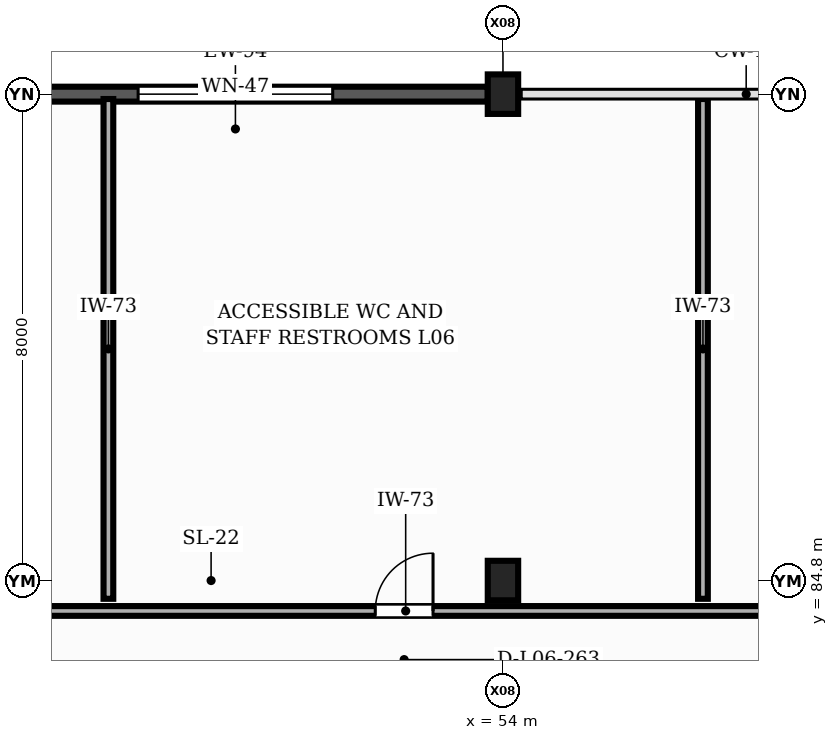
"""IFC4 building model, lengths in metres.
Left out: names, types, materials, properties, quantities, classifications, styles, units other than length and angle.
Written with IfcOpenShell. Run it as: python <this file> out.ifc"""

import sys

from ifc_helpers import new_model, si_unit, direction, frame, frame_2d, origin, origin_2d, place, context, subcontext, project, spatial, rectangle, extrude, element, fill, save


model = new_model("IFC4")
c1 = context("Model", 3, precision=1e-05, world=origin(), true_north=direction((0.0, 1.0)))
c2 = subcontext(c1, "Body", "Model", "MODEL_VIEW")
j1 = project(units=[si_unit("LENGTHUNIT", "METRE"), si_unit("PLANEANGLEUNIT", "RADIAN")], contexts=[c1])
p1 = place(None, origin())
s1 = spatial("IfcSite", under=j1, at=p1, CompositionType="ELEMENT")
p2 = place(p1, origin())
s2 = spatial("IfcBuilding", under=s1, at=p2, CompositionType="ELEMENT")
p3 = place(p2, frame((0.0, 0.0, 25.8)))
s3 = spatial("IfcBuildingStorey", under=s2, at=p3, CompositionType="ELEMENT", Elevation=25.8)
for number, where, z_axis, x_axis in (
    (1, (54.0, 84.8, 0.0), (0.0, 0.0, 1.0), (1.0, 0.0, 0.0)),
    (2, (54.0, 92.8, 0.0), (0.0, 0.0, 1.0), (1.0, 0.0, 0.0)),
):
    element("IfcColumn", number, at=place(p3, frame(where, z_axis=z_axis, x_axis=x_axis)), inside=s3, PredefinedType="COLUMN", context=c2, shape_type="SweptSolid", body=[
        extrude(rectangle(XDim=0.5, YDim=0.65, at=origin_2d()), origin(), (0.0, 0.0, 1.0), 3.9),
    ])
p4 = place(p3, frame((53.75, 92.8, 0.0), z_axis=(0.0, 0.0, 1.0), x_axis=(-1.0, 0.0, 0.0)))
e3 = element("IfcWall", 3, at=p4, inside=s3, PredefinedType="SOLIDWALL", context=c2, shape_type="SweptSolid", body=[
    extrude(rectangle(XDim=8.3, YDim=0.245, at=frame_2d((4.15, 0.0))), origin(), (0.0, 0.0, 1.0), 3.01),
])
p5 = place(p4, frame((2.55, 0.0, 0.9)))
e4 = element("IfcOpeningElement", 4, at=p5, cuts=e3, PredefinedType="OPENING", context=c2, shape_type="SweptSolid", body=[
    extrude(rectangle(XDim=3.2, YDim=1.6, at=frame_2d((1.6, 0.8))), frame((0.0, 0.133, 0.0), z_axis=(0.0, -1.0, 0.0), x_axis=(1.0, 0.0, 0.0)), (0.0, 0.0, 1.0), 0.265),
])
p6 = place(p3, frame((47.511, 84.5, 0.0), z_axis=(0.0, 0.0, 1.0), x_axis=(0.0, 1.0, 0.0)))
e5 = element("IfcWall", 5, at=p6, inside=s3, PredefinedType="PARTITIONING", context=c2, shape_type="SweptSolid", body=[
    extrude(rectangle(XDim=8.22, YDim=0.16, at=frame_2d((4.11, 0.0))), origin(), (0.0, 0.0, 1.0), 2.895),
])
p7 = place(p3, frame((57.289, 84.5, 0.0), z_axis=(0.0, 0.0, 1.0), x_axis=(0.0, 1.0, 0.0)))
e6 = element("IfcWall", 6, at=p7, inside=s3, PredefinedType="PARTITIONING", context=c2, shape_type="SweptSolid", body=[
    extrude(rectangle(XDim=8.22, YDim=0.16, at=frame_2d((4.11, 0.0))), origin(), (0.0, 0.0, 1.0), 2.945),
])
p8 = place(p3, frame((34.7, 84.3, 0.0), z_axis=(0.0, 0.0, 1.0), x_axis=(1.0, 0.0, 0.0)))
e7 = element("IfcWall", 7, at=p8, inside=s3, PredefinedType="PARTITIONING", context=c2, shape_type="SweptSolid", body=[
    extrude(rectangle(XDim=35.4, YDim=0.16, at=frame_2d((17.7, 0.0))), origin(), (0.0, 0.0, 1.0), 2.895),
])
p9 = place(p8, frame((5.92, 0.0, 0.0)))
e8 = element("IfcOpeningElement", 8, at=p9, cuts=e7, PredefinedType="OPENING", context=c2, shape_type="SweptSolid", body=[
    extrude(rectangle(XDim=0.9, YDim=2.1, at=frame_2d((0.45, 1.05))), frame((0.0, 0.09, 0.0), z_axis=(0.0, -1.0, 0.0), x_axis=(1.0, 0.0, 0.0)), (0.0, 0.0, 1.0), 0.18),
])
p10 = place(p8, frame((17.2, 0.0, 0.0)))
e9 = element("IfcOpeningElement", 9, at=p10, cuts=e7, PredefinedType="OPENING", context=c2, shape_type="SweptSolid", body=[
    extrude(rectangle(XDim=0.95, YDim=2.15, at=frame_2d((0.475, 1.075))), frame((0.0, 0.09, 0.0), z_axis=(0.0, -1.0, 0.0), x_axis=(1.0, 0.0, 0.0)), (0.0, 0.0, 1.0), 0.18),
])
p11 = place(p8, frame((28.48, 0.0, 0.0)))
e10 = element("IfcOpeningElement", 10, at=p11, cuts=e7, PredefinedType="OPENING", context=c2, shape_type="SweptSolid", body=[
    extrude(rectangle(XDim=0.95, YDim=2.1, at=frame_2d((0.475, 1.05))), frame((0.0, 0.09, 0.0), z_axis=(0.0, -1.0, 0.0), x_axis=(1.0, 0.0, 0.0)), (0.0, 0.0, 1.0), 0.18),
])
p12 = place(p5, origin())
e11 = element("IfcWindow", 11, at=p12, inside=s3, PartitioningType="SINGLE_PANEL", PredefinedType="WINDOW", context=c2, shape_type="SweptSolid", body=[
    extrude(rectangle(XDim=3.2, YDim=1.6, at=frame_2d((1.6, 0.8))), frame((0.0, 0.03, 0.0), z_axis=(0.0, -1.0, 0.0), x_axis=(1.0, 0.0, 0.0)), (0.0, 0.0, 1.0), 0.06),
])
fill(e4, e11)
p13 = place(p10, origin())
e12 = element("IfcDoor", 12, at=p13, inside=s3, OperationType="SINGLE_SWING_RIGHT", PredefinedType="DOOR", context=c2, shape_type="SweptSolid", body=[
    extrude(rectangle(XDim=0.95, YDim=2.15, at=frame_2d((0.475, 1.075))), frame((0.0, 0.025, 0.0), z_axis=(0.0, -1.0, 0.0), x_axis=(1.0, 0.0, 0.0)), (0.0, 0.0, 1.0), 0.05),
])
fill(e9, e12)
save(model, sys.argv[1])
